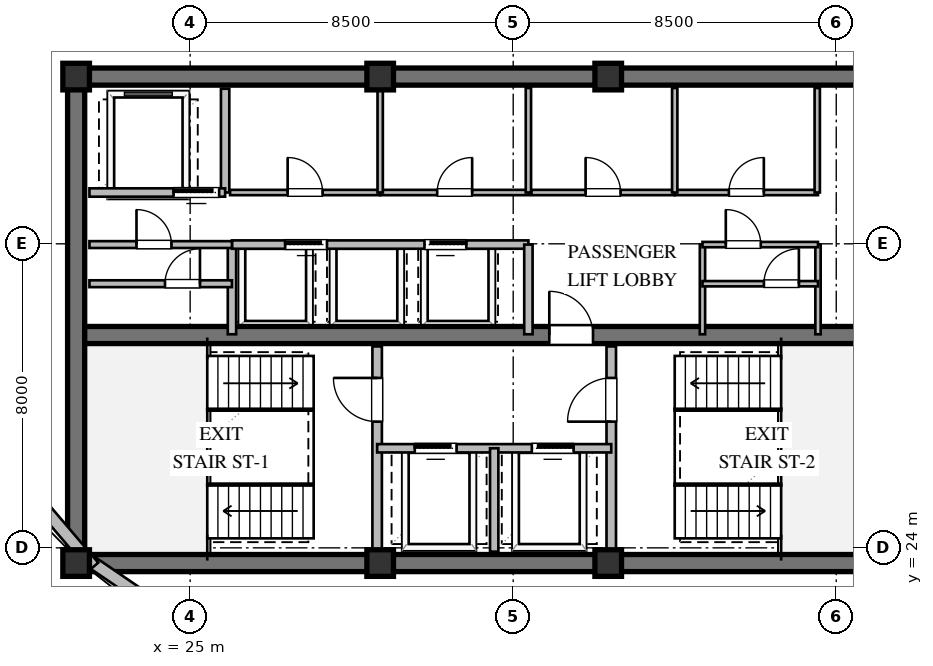
"""IFC4 building model, lengths in metres.
Left out: names, types, materials, properties, quantities, classifications, styles, units other than length and angle.
Written with IfcOpenShell. Run it as: python <this file> out.ifc"""

import sys

from ifc_helpers import new_model, si_unit, direction, frame, frame_2d, origin, origin_2d, place, context, subcontext, project, spatial, rectangle, extrude, element, fill, save


model = new_model("IFC4")
c1 = context("Model", 3, precision=1e-05, world=origin(), true_north=direction((0.0, 1.0)))
c2 = subcontext(c1, "Body", "Model", "MODEL_VIEW")
j1 = project(units=[si_unit("LENGTHUNIT", "METRE"), si_unit("PLANEANGLEUNIT", "RADIAN")], contexts=[c1])
p1 = place(None, origin())
s1 = spatial("IfcSite", under=j1, at=p1, CompositionType="ELEMENT")
p2 = place(p1, origin())
s2 = spatial("IfcBuilding", under=s1, at=p2, CompositionType="ELEMENT")
p3 = place(p2, frame((0.0, 0.0, 270.0)))
s3 = spatial("IfcBuildingStorey", under=s2, at=p3, CompositionType="ELEMENT", Elevation=270.0)
for number, where, z_axis, x_axis in (
    (1, (21.775, 23.6, 0.0), (0.0, 0.0, 1.0), (1.0, 0.0, 0.0)),
    (2, (21.775, 36.4, 0.0), (0.0, 0.0, 1.0), (1.0, 0.0, 0.0)),
):
    element("IfcWall", number, at=place(p3, frame(where, z_axis=z_axis, x_axis=x_axis)), inside=s3, PredefinedType="SHEAR", context=c2, shape_type="SweptSolid", body=[
        extrude(rectangle(XDim=22.45, YDim=0.45, at=frame_2d((11.225, 0.0))), origin(), (0.0, 0.0, 1.0), 3.56),
    ])
p4 = place(p3, frame((22.0, 23.825, 0.0), z_axis=(0.0, 0.0, 1.0), x_axis=(0.0, 1.0, 0.0)))
e3 = element("IfcWall", 3, at=p4, inside=s3, PredefinedType="SHEAR", context=c2, shape_type="SweptSolid", body=[
    extrude(rectangle(XDim=12.35, YDim=0.45, at=frame_2d((6.175, 0.0))), origin(), (0.0, 0.0, 1.0), 3.56),
])
p5 = place(p3, frame((22.225, 29.6, 0.0), z_axis=(0.0, 0.0, 1.0), x_axis=(1.0, 0.0, 0.0)))
e4 = element("IfcWall", 4, at=p5, inside=s3, PredefinedType="SHEAR", context=c2, shape_type="SweptSolid", body=[
    extrude(rectangle(XDim=21.55, YDim=0.45, at=frame_2d((10.775, 0.0))), origin(), (0.0, 0.0, 1.0), 3.56),
])
p6 = place(p5, frame((12.225, 0.0, 0.0)))
e5 = element("IfcOpeningElement", 5, at=p6, cuts=e4, PredefinedType="OPENING", context=c2, shape_type="SweptSolid", body=[
    extrude(rectangle(XDim=1.15, YDim=2.1, at=frame_2d((0.575, 1.05))), frame((0.0, 0.235, 0.0), z_axis=(0.0, -1.0, 0.0), x_axis=(1.0, 0.0, 0.0)), (0.0, 0.0, 1.0), 0.47),
])
for number, where, z_axis, x_axis in (
    (6, (22.0, 23.6, 0.0), (0.0, 0.0, 1.0), (1.0, 0.0, 0.0)),
    (7, (30.0, 23.6, 0.0), (0.0, 0.0, 1.0), (1.0, 0.0, 0.0)),
    (8, (36.0, 23.6, 0.0), (0.0, 0.0, 1.0), (1.0, 0.0, 0.0)),
    (9, (36.0, 36.4, 0.0), (0.0, 0.0, 1.0), (1.0, 0.0, 0.0)),
    (10, (30.0, 36.4, 0.0), (0.0, 0.0, 1.0), (1.0, 0.0, 0.0)),
    (11, (22.0, 36.4, 0.0), (0.0, 0.0, 1.0), (1.0, 0.0, 0.0)),
):
    element("IfcColumn", number, at=place(p3, frame(where, z_axis=z_axis, x_axis=x_axis)), inside=s3, PredefinedType="COLUMN", context=c2, shape_type="SweptSolid", body=[
        extrude(rectangle(XDim=0.7, YDim=0.7, at=origin_2d()), origin(), (0.0, 0.0, 1.0), 3.8),
    ])
p7 = place(p3, frame((27.093, 20.428, 0.0), z_axis=(0.0, 0.0, 1.0), x_axis=(-0.826047009588, 0.563601222454, 0.0)))
e12 = element("IfcWall", 12, at=p7, inside=s3, PredefinedType="STANDARD", context=c2, shape_type="SweptSolid", body=[
    extrude(rectangle(XDim=6.074, YDim=0.32, at=frame_2d((3.037, 0.0))), origin(), (0.0, 0.0, 1.0), 2.35),
])
p8 = place(p3, frame((22.46, 23.506, 0.0), z_axis=(0.0, 0.0, 1.0), x_axis=(-0.648393724369, 0.761305180725, 0.0)))
e13 = element("IfcWall", 13, at=p8, inside=s3, PredefinedType="STANDARD", context=c2, shape_type="SweptSolid", body=[
    extrude(rectangle(XDim=5.836, YDim=0.32, at=frame_2d((2.918, 0.0))), origin(), (0.0, 0.0, 1.0), 2.7),
])
p9 = place(p3, frame((29.92, 23.9, 0.0), z_axis=(0.0, 0.0, 1.0), x_axis=(0.0, 1.0, 0.0)))
e14 = element("IfcWall", 14, at=p9, inside=s3, PredefinedType="SOLIDWALL", context=c2, shape_type="SweptSolid", body=[
    extrude(rectangle(XDim=5.4, YDim=0.25, at=frame_2d((2.7, 0.0))), origin(), (0.0, 0.0, 1.0), 3.09),
])
p10 = place(p9, frame((3.421, 0.0, 0.0)))
e15 = element("IfcOpeningElement", 15, at=p10, cuts=e14, PredefinedType="OPENING", context=c2, shape_type="SweptSolid", body=[
    extrude(rectangle(XDim=1.15, YDim=2.1, at=frame_2d((0.575, 1.05))), frame((0.0, 0.135, 0.0), z_axis=(0.0, -1.0, 0.0), x_axis=(1.0, 0.0, 0.0)), (0.0, 0.0, 1.0), 0.27),
])
p11 = place(p3, frame((36.08, 23.9, 0.0), z_axis=(0.0, 0.0, 1.0), x_axis=(0.0, 1.0, 0.0)))
e16 = element("IfcWall", 16, at=p11, inside=s3, PredefinedType="SOLIDWALL", context=c2, shape_type="SweptSolid", body=[
    extrude(rectangle(XDim=5.4, YDim=0.25, at=frame_2d((2.7, 0.0))), origin(), (0.0, 0.0, 1.0), 3.56),
])
p12 = place(p11, frame((3.421, 0.0, 0.0)))
e17 = element("IfcOpeningElement", 17, at=p12, cuts=e16, PredefinedType="OPENING", context=c2, shape_type="SweptSolid", body=[
    extrude(rectangle(XDim=1.15, YDim=2.1, at=frame_2d((0.575, 1.05))), frame((0.0, 0.135, 0.0), z_axis=(0.0, -1.0, 0.0), x_axis=(1.0, 0.0, 0.0)), (0.0, 0.0, 1.0), 0.27),
])
p13 = place(p3, frame((29.92, 26.62, 0.0), z_axis=(0.0, 0.0, 1.0), x_axis=(1.0, 0.0, 0.0)))
e18 = element("IfcWall", 18, at=p13, inside=s3, PredefinedType="SOLIDWALL", context=c2, shape_type="SweptSolid", body=[
    extrude(rectangle(XDim=6.16, YDim=0.22, at=frame_2d((3.08, 0.0))), origin(), (0.0, 0.0, 1.0), 3.56),
])
p14 = place(p13, frame((0.99, 0.0, 0.0)))
e19 = element("IfcOpeningElement", 19, at=p14, cuts=e18, PredefinedType="OPENING", context=c2, shape_type="SweptSolid", body=[
    extrude(rectangle(XDim=1.1, YDim=2.1, at=frame_2d((0.55, 1.05))), frame((0.0, 0.12, 0.0), z_axis=(0.0, -1.0, 0.0), x_axis=(1.0, 0.0, 0.0)), (0.0, 0.0, 1.0), 0.24),
])
p15 = place(p13, frame((4.07, 0.0, 0.0)))
e20 = element("IfcOpeningElement", 20, at=p15, cuts=e18, PredefinedType="OPENING", context=c2, shape_type="SweptSolid", body=[
    extrude(rectangle(XDim=1.1, YDim=2.1, at=frame_2d((0.55, 1.05))), frame((0.0, 0.12, 0.0), z_axis=(0.0, -1.0, 0.0), x_axis=(1.0, 0.0, 0.0)), (0.0, 0.0, 1.0), 0.24),
])
p16 = place(p3, frame((33.0, 23.9, 0.0), z_axis=(0.0, 0.0, 1.0), x_axis=(0.0, 1.0, 0.0)))
e21 = element("IfcWall", 21, at=p16, inside=s3, PredefinedType="SOLIDWALL", context=c2, shape_type="SweptSolid", body=[
    extrude(rectangle(XDim=2.72, YDim=0.22, at=frame_2d((1.36, 0.0))), origin(), (0.0, 0.0, 1.0), 3.56),
])
p17 = place(p3, frame((25.92, 33.35, 0.0), z_axis=(0.0, 0.0, 1.0), x_axis=(0.0, 1.0, 0.0)))
e22 = element("IfcWall", 22, at=p17, inside=s3, PredefinedType="SOLIDWALL", context=c2, shape_type="SweptSolid", body=[
    extrude(rectangle(XDim=2.73, YDim=0.22, at=frame_2d((1.365, 0.0))), origin(), (0.0, 0.0, 1.0), 3.56),
])
p18 = place(p3, frame((22.35, 33.35, 0.0), z_axis=(0.0, 0.0, 1.0), x_axis=(1.0, 0.0, 0.0)))
e23 = element("IfcWall", 23, at=p18, inside=s3, PredefinedType="SOLIDWALL", context=c2, shape_type="SweptSolid", body=[
    extrude(rectangle(XDim=3.57, YDim=0.22, at=frame_2d((1.785, 0.0))), origin(), (0.0, 0.0, 1.0), 3.56),
])
p19 = place(p18, frame((2.213, 0.0, 0.0)))
e24 = element("IfcOpeningElement", 24, at=p19, cuts=e23, PredefinedType="OPENING", context=c2, shape_type="SweptSolid", body=[
    extrude(rectangle(XDim=1.2, YDim=2.1, at=frame_2d((0.6, 1.05))), frame((0.0, 0.12, 0.0), z_axis=(0.0, -1.0, 0.0), x_axis=(1.0, 0.0, 0.0)), (0.0, 0.0, 1.0), 0.24),
])
p20 = place(p3, frame((26.1, 29.62, 0.0), z_axis=(0.0, 0.0, 1.0), x_axis=(0.0, 1.0, 0.0)))
e25 = element("IfcWall", 25, at=p20, inside=s3, PredefinedType="SOLIDWALL", context=c2, shape_type="SweptSolid", body=[
    extrude(rectangle(XDim=2.36, YDim=0.22, at=frame_2d((1.18, 0.0))), origin(), (0.0, 0.0, 1.0), 3.56),
])
p21 = place(p3, frame((26.1, 31.98, 0.0), z_axis=(0.0, 0.0, 1.0), x_axis=(1.0, 0.0, 0.0)))
e26 = element("IfcWall", 26, at=p21, inside=s3, PredefinedType="SOLIDWALL", context=c2, shape_type="SweptSolid", body=[
    extrude(rectangle(XDim=7.8, YDim=0.22, at=frame_2d((3.9, 0.0))), origin(), (0.0, 0.0, 1.0), 3.56),
])
p22 = place(p21, frame((1.4, 0.0, 0.0)))
e27 = element("IfcOpeningElement", 27, at=p22, cuts=e26, PredefinedType="OPENING", context=c2, shape_type="SweptSolid", body=[
    extrude(rectangle(XDim=1.1, YDim=2.1, at=frame_2d((0.55, 1.05))), frame((0.0, 0.12, 0.0), z_axis=(0.0, -1.0, 0.0), x_axis=(1.0, 0.0, 0.0)), (0.0, 0.0, 1.0), 0.24),
])
p23 = place(p21, frame((5.066, 0.0, 0.0)))
e28 = element("IfcOpeningElement", 28, at=p23, cuts=e26, PredefinedType="OPENING", context=c2, shape_type="SweptSolid", body=[
    extrude(rectangle(XDim=1.1, YDim=2.1, at=frame_2d((0.55, 1.05))), frame((0.0, 0.12, 0.0), z_axis=(0.0, -1.0, 0.0), x_axis=(1.0, 0.0, 0.0)), (0.0, 0.0, 1.0), 0.24),
])
p24 = place(p3, frame((33.9, 29.62, 0.0), z_axis=(0.0, 0.0, 1.0), x_axis=(0.0, 1.0, 0.0)))
e29 = element("IfcWall", 29, at=p24, inside=s3, PredefinedType="SOLIDWALL", context=c2, shape_type="SweptSolid", body=[
    extrude(rectangle(XDim=2.36, YDim=0.22, at=frame_2d((1.18, 0.0))), origin(), (0.0, 0.0, 1.0), 3.56),
])
p25 = place(p3, frame((26.05, 33.35, 0.0), z_axis=(0.0, 0.0, 1.0), x_axis=(1.0, 0.0, 0.0)))
e30 = element("IfcWall", 30, at=p25, inside=s3, PredefinedType="PARTITIONING", context=c2, shape_type="SweptSolid", body=[
    extrude(rectangle(XDim=3.95, YDim=0.14, at=frame_2d((1.975, 0.0))), origin(), (0.0, 0.0, 1.0), 3.56),
])
p26 = place(p25, frame((1.515, 0.0, 0.0)))
e31 = element("IfcOpeningElement", 31, at=p26, cuts=e30, PredefinedType="OPENING", context=c2, shape_type="SweptSolid", body=[
    extrude(rectangle(XDim=0.92, YDim=2.1, at=frame_2d((0.46, 1.05))), frame((0.0, 0.08, 0.0), z_axis=(0.0, -1.0, 0.0), x_axis=(1.0, 0.0, 0.0)), (0.0, 0.0, 1.0), 0.16),
])
p27 = place(p3, frame((30.0, 33.35, 0.0), z_axis=(0.0, 0.0, 1.0), x_axis=(1.0, 0.0, 0.0)))
e32 = element("IfcWall", 32, at=p27, inside=s3, PredefinedType="PARTITIONING", context=c2, shape_type="SweptSolid", body=[
    extrude(rectangle(XDim=3.92, YDim=0.14, at=frame_2d((1.96, 0.0))), origin(), (0.0, 0.0, 1.0), 3.56),
])
p28 = place(p27, frame((1.5, 0.0, 0.0)))
e33 = element("IfcOpeningElement", 33, at=p28, cuts=e32, PredefinedType="OPENING", context=c2, shape_type="SweptSolid", body=[
    extrude(rectangle(XDim=0.92, YDim=2.1, at=frame_2d((0.46, 1.05))), frame((0.0, 0.08, 0.0), z_axis=(0.0, -1.0, 0.0), x_axis=(1.0, 0.0, 0.0)), (0.0, 0.0, 1.0), 0.16),
])
for number, where, z_axis, x_axis in (
    (34, (30.0, 33.35, 0.0), (0.0, 0.0, 1.0), (0.0, 1.0, 0.0)),
    (35, (33.9, 33.35, 0.0), (0.0, 0.0, 1.0), (0.0, 1.0, 0.0)),
):
    element("IfcWall", number, at=place(p3, frame(where, z_axis=z_axis, x_axis=x_axis)), inside=s3, PredefinedType="PARTITIONING", context=c2, shape_type="SweptSolid", body=[
        extrude(rectangle(XDim=2.75, YDim=0.14, at=frame_2d((1.375, 0.0))), origin(), (0.0, 0.0, 1.0), 3.56),
    ])
p29 = place(p3, frame((33.98, 33.35, 0.0), z_axis=(0.0, 0.0, 1.0), x_axis=(1.0, 0.0, 0.0)))
e36 = element("IfcWall", 36, at=p29, inside=s3, PredefinedType="PARTITIONING", context=c2, shape_type="SweptSolid", body=[
    extrude(rectangle(XDim=3.77, YDim=0.14, at=frame_2d((1.885, 0.0))), origin(), (0.0, 0.0, 1.0), 3.56),
])
p30 = place(p29, frame((1.425, 0.0, 0.0)))
e37 = element("IfcOpeningElement", 37, at=p30, cuts=e36, PredefinedType="OPENING", context=c2, shape_type="SweptSolid", body=[
    extrude(rectangle(XDim=0.92, YDim=2.1, at=frame_2d((0.46, 1.05))), frame((0.0, 0.08, 0.0), z_axis=(0.0, -1.0, 0.0), x_axis=(1.0, 0.0, 0.0)), (0.0, 0.0, 1.0), 0.16),
])
p31 = place(p3, frame((37.75, 33.35, 0.0), z_axis=(0.0, 0.0, 1.0), x_axis=(1.0, 0.0, 0.0)))
e38 = element("IfcWall", 38, at=p31, inside=s3, PredefinedType="PARTITIONING", context=c2, shape_type="SweptSolid", body=[
    extrude(rectangle(XDim=3.77, YDim=0.14, at=frame_2d((1.885, 0.0))), origin(), (0.0, 0.0, 1.0), 3.56),
])
p32 = place(p31, frame((1.425, 0.0, 0.0)))
e39 = element("IfcOpeningElement", 39, at=p32, cuts=e38, PredefinedType="OPENING", context=c2, shape_type="SweptSolid", body=[
    extrude(rectangle(XDim=0.92, YDim=2.1, at=frame_2d((0.46, 1.05))), frame((0.0, 0.08, 0.0), z_axis=(0.0, -1.0, 0.0), x_axis=(1.0, 0.0, 0.0)), (0.0, 0.0, 1.0), 0.16),
])
for number, where, z_axis, x_axis in (
    (40, (37.75, 33.35, 0.0), (0.0, 0.0, 1.0), (0.0, 1.0, 0.0)),
    (41, (41.5, 33.35, 0.0), (0.0, 0.0, 1.0), (0.0, 1.0, 0.0)),
):
    element("IfcWall", number, at=place(p3, frame(where, z_axis=z_axis, x_axis=x_axis)), inside=s3, PredefinedType="PARTITIONING", context=c2, shape_type="SweptSolid", body=[
        extrude(rectangle(XDim=2.75, YDim=0.14, at=frame_2d((1.375, 0.0))), origin(), (0.0, 0.0, 1.0), 3.56),
    ])
p33 = place(p3, frame((22.35, 30.95, 0.0), z_axis=(0.0, 0.0, 1.0), x_axis=(1.0, 0.0, 0.0)))
e42 = element("IfcWall", 42, at=p33, inside=s3, PredefinedType="PARTITIONING", context=c2, shape_type="SweptSolid", body=[
    extrude(rectangle(XDim=3.75, YDim=0.18, at=frame_2d((1.875, 0.0))), origin(), (0.0, 0.0, 1.0), 3.56),
])
p34 = place(p33, frame((1.988, 0.0, 0.0)))
e43 = element("IfcOpeningElement", 43, at=p34, cuts=e42, PredefinedType="OPENING", context=c2, shape_type="SweptSolid", body=[
    extrude(rectangle(XDim=0.92, YDim=2.1, at=frame_2d((0.46, 1.05))), frame((0.0, 0.1, 0.0), z_axis=(0.0, -1.0, 0.0), x_axis=(1.0, 0.0, 0.0)), (0.0, 0.0, 1.0), 0.2),
])
p35 = place(p3, frame((22.35, 31.98, 0.0), z_axis=(0.0, 0.0, 1.0), x_axis=(1.0, 0.0, 0.0)))
e44 = element("IfcWall", 44, at=p35, inside=s3, PredefinedType="PARTITIONING", context=c2, shape_type="SweptSolid", body=[
    extrude(rectangle(XDim=3.75, YDim=0.18, at=frame_2d((1.875, 0.0))), origin(), (0.0, 0.0, 1.0), 3.56),
])
p36 = place(p35, frame((1.238, 0.0, 0.0)))
e45 = element("IfcOpeningElement", 45, at=p36, cuts=e44, PredefinedType="OPENING", context=c2, shape_type="SweptSolid", body=[
    extrude(rectangle(XDim=0.92, YDim=2.1, at=frame_2d((0.46, 1.05))), frame((0.0, 0.1, 0.0), z_axis=(0.0, -1.0, 0.0), x_axis=(1.0, 0.0, 0.0)), (0.0, 0.0, 1.0), 0.2),
])
for number, where, z_axis, x_axis in (
    (46, (38.48, 29.62, 0.0), (0.0, 0.0, 1.0), (0.0, 1.0, 0.0)),
    (47, (41.52, 29.62, 0.0), (0.0, 0.0, 1.0), (0.0, 1.0, 0.0)),
):
    element("IfcWall", number, at=place(p3, frame(where, z_axis=z_axis, x_axis=x_axis)), inside=s3, PredefinedType="PARTITIONING", context=c2, shape_type="SweptSolid", body=[
        extrude(rectangle(XDim=2.36, YDim=0.14, at=frame_2d((1.18, 0.0))), origin(), (0.0, 0.0, 1.0), 3.56),
    ])
p37 = place(p3, frame((38.48, 30.95, 0.0), z_axis=(0.0, 0.0, 1.0), x_axis=(1.0, 0.0, 0.0)))
e48 = element("IfcWall", 48, at=p37, inside=s3, PredefinedType="PARTITIONING", context=c2, shape_type="SweptSolid", body=[
    extrude(rectangle(XDim=3.04, YDim=0.14, at=frame_2d((1.52, 0.0))), origin(), (0.0, 0.0, 1.0), 3.56),
])
p38 = place(p37, frame((1.617, 0.0, 0.0)))
e49 = element("IfcOpeningElement", 49, at=p38, cuts=e48, PredefinedType="OPENING", context=c2, shape_type="SweptSolid", body=[
    extrude(rectangle(XDim=0.92, YDim=2.1, at=frame_2d((0.46, 1.05))), frame((0.0, 0.08, 0.0), z_axis=(0.0, -1.0, 0.0), x_axis=(1.0, 0.0, 0.0)), (0.0, 0.0, 1.0), 0.16),
])
p39 = place(p3, frame((38.48, 31.98, 0.0), z_axis=(0.0, 0.0, 1.0), x_axis=(1.0, 0.0, 0.0)))
e50 = element("IfcWall", 50, at=p39, inside=s3, PredefinedType="PARTITIONING", context=c2, shape_type="SweptSolid", body=[
    extrude(rectangle(XDim=3.04, YDim=0.14, at=frame_2d((1.52, 0.0))), origin(), (0.0, 0.0, 1.0), 3.56),
])
p40 = place(p39, frame((0.614, 0.0, 0.0)))
e51 = element("IfcOpeningElement", 51, at=p40, cuts=e50, PredefinedType="OPENING", context=c2, shape_type="SweptSolid", body=[
    extrude(rectangle(XDim=0.92, YDim=2.1, at=frame_2d((0.46, 1.05))), frame((0.0, 0.08, 0.0), z_axis=(0.0, -1.0, 0.0), x_axis=(1.0, 0.0, 0.0)), (0.0, 0.0, 1.0), 0.16),
])
p41 = place(p10, origin())
e52 = element("IfcDoor", 52, at=p41, inside=s3, OperationType="SINGLE_SWING_RIGHT", PredefinedType="DOOR", context=c2, shape_type="SweptSolid", body=[
    extrude(rectangle(XDim=1.15, YDim=2.1, at=frame_2d((0.575, 1.05))), frame((0.0, 0.025, 0.0), z_axis=(0.0, -1.0, 0.0), x_axis=(1.0, 0.0, 0.0)), (0.0, 0.0, 1.0), 0.05),
])
fill(e15, e52)
p42 = place(p12, origin())
e53 = element("IfcDoor", 53, at=p42, inside=s3, OperationType="SINGLE_SWING_LEFT", PredefinedType="DOOR", context=c2, shape_type="SweptSolid", body=[
    extrude(rectangle(XDim=1.15, YDim=2.1, at=frame_2d((0.575, 1.05))), frame((0.0, 0.025, 0.0), z_axis=(0.0, -1.0, 0.0), x_axis=(1.0, 0.0, 0.0)), (0.0, 0.0, 1.0), 0.05),
])
fill(e17, e53)
p43 = place(p14, origin())
e54 = element("IfcDoor", 54, at=p43, inside=s3, OperationType="SLIDING_TO_LEFT", PredefinedType="DOOR", context=c2, shape_type="SweptSolid", body=[
    extrude(rectangle(XDim=1.1, YDim=2.1, at=frame_2d((0.55, 1.05))), frame((0.0, 0.025, 0.0), z_axis=(0.0, -1.0, 0.0), x_axis=(1.0, 0.0, 0.0)), (0.0, 0.0, 1.0), 0.05),
])
fill(e19, e54)
p44 = place(p15, origin())
e55 = element("IfcDoor", 55, at=p44, inside=s3, OperationType="SLIDING_TO_RIGHT", PredefinedType="DOOR", context=c2, shape_type="SweptSolid", body=[
    extrude(rectangle(XDim=1.1, YDim=2.1, at=frame_2d((0.55, 1.05))), frame((0.0, 0.025, 0.0), z_axis=(0.0, -1.0, 0.0), x_axis=(1.0, 0.0, 0.0)), (0.0, 0.0, 1.0), 0.05),
])
fill(e20, e55)
p45 = place(p6, origin())
e56 = element("IfcDoor", 56, at=p45, inside=s3, OperationType="SINGLE_SWING_LEFT", PredefinedType="DOOR", context=c2, shape_type="SweptSolid", body=[
    extrude(rectangle(XDim=1.15, YDim=2.1, at=frame_2d((0.575, 1.05))), frame((0.0, 0.025, 0.0), z_axis=(0.0, -1.0, 0.0), x_axis=(1.0, 0.0, 0.0)), (0.0, 0.0, 1.0), 0.05),
])
fill(e5, e56)
p46 = place(p19, origin())
e57 = element("IfcDoor", 57, at=p46, inside=s3, OperationType="SLIDING_TO_LEFT", PredefinedType="DOOR", context=c2, shape_type="SweptSolid", body=[
    extrude(rectangle(XDim=1.2, YDim=2.1, at=frame_2d((0.6, 1.05))), frame((0.0, 0.025, 0.0), z_axis=(0.0, -1.0, 0.0), x_axis=(1.0, 0.0, 0.0)), (0.0, 0.0, 1.0), 0.05),
])
fill(e24, e57)
p47 = place(p22, origin())
e58 = element("IfcDoor", 58, at=p47, inside=s3, OperationType="SLIDING_TO_LEFT", PredefinedType="DOOR", context=c2, shape_type="SweptSolid", body=[
    extrude(rectangle(XDim=1.1, YDim=2.1, at=frame_2d((0.55, 1.05))), frame((0.0, 0.025, 0.0), z_axis=(0.0, -1.0, 0.0), x_axis=(1.0, 0.0, 0.0)), (0.0, 0.0, 1.0), 0.05),
])
fill(e27, e58)
p48 = place(p23, origin())
e59 = element("IfcDoor", 59, at=p48, inside=s3, OperationType="SLIDING_TO_RIGHT", PredefinedType="DOOR", context=c2, shape_type="SweptSolid", body=[
    extrude(rectangle(XDim=1.1, YDim=2.1, at=frame_2d((0.55, 1.05))), frame((0.0, 0.025, 0.0), z_axis=(0.0, -1.0, 0.0), x_axis=(1.0, 0.0, 0.0)), (0.0, 0.0, 1.0), 0.05),
])
fill(e28, e59)
p49 = place(p26, origin())
e60 = element("IfcDoor", 60, at=p49, inside=s3, OperationType="SINGLE_SWING_LEFT", PredefinedType="DOOR", context=c2, shape_type="SweptSolid", body=[
    extrude(rectangle(XDim=0.92, YDim=2.1, at=frame_2d((0.46, 1.05))), frame((0.0, 0.025, 0.0), z_axis=(0.0, -1.0, 0.0), x_axis=(1.0, 0.0, 0.0)), (0.0, 0.0, 1.0), 0.05),
])
fill(e31, e60)
p50 = place(p28, origin())
e61 = element("IfcDoor", 61, at=p50, inside=s3, OperationType="SINGLE_SWING_RIGHT", PredefinedType="DOOR", context=c2, shape_type="SweptSolid", body=[
    extrude(rectangle(XDim=0.92, YDim=2.1, at=frame_2d((0.46, 1.05))), frame((0.0, 0.025, 0.0), z_axis=(0.0, -1.0, 0.0), x_axis=(1.0, 0.0, 0.0)), (0.0, 0.0, 1.0), 0.05),
])
fill(e33, e61)
p51 = place(p30, origin())
e62 = element("IfcDoor", 62, at=p51, inside=s3, OperationType="SINGLE_SWING_LEFT", PredefinedType="DOOR", context=c2, shape_type="SweptSolid", body=[
    extrude(rectangle(XDim=0.92, YDim=2.1, at=frame_2d((0.46, 1.05))), frame((0.0, 0.025, 0.0), z_axis=(0.0, -1.0, 0.0), x_axis=(1.0, 0.0, 0.0)), (0.0, 0.0, 1.0), 0.05),
])
fill(e37, e62)
p52 = place(p32, origin())
e63 = element("IfcDoor", 63, at=p52, inside=s3, OperationType="SINGLE_SWING_RIGHT", PredefinedType="DOOR", context=c2, shape_type="SweptSolid", body=[
    extrude(rectangle(XDim=0.92, YDim=2.1, at=frame_2d((0.46, 1.05))), frame((0.0, 0.025, 0.0), z_axis=(0.0, -1.0, 0.0), x_axis=(1.0, 0.0, 0.0)), (0.0, 0.0, 1.0), 0.05),
])
fill(e39, e63)
p53 = place(p36, origin())
e64 = element("IfcDoor", 64, at=p53, inside=s3, OperationType="SINGLE_SWING_LEFT", PredefinedType="DOOR", context=c2, shape_type="SweptSolid", body=[
    extrude(rectangle(XDim=0.92, YDim=2.1, at=frame_2d((0.46, 1.05))), frame((0.0, 0.025, 0.0), z_axis=(0.0, -1.0, 0.0), x_axis=(1.0, 0.0, 0.0)), (0.0, 0.0, 1.0), 0.05),
])
fill(e45, e64)
p54 = place(p34, origin())
e65 = element("IfcDoor", 65, at=p54, inside=s3, OperationType="SINGLE_SWING_RIGHT", PredefinedType="DOOR", context=c2, shape_type="SweptSolid", body=[
    extrude(rectangle(XDim=0.92, YDim=2.1, at=frame_2d((0.46, 1.05))), frame((0.0, 0.025, 0.0), z_axis=(0.0, -1.0, 0.0), x_axis=(1.0, 0.0, 0.0)), (0.0, 0.0, 1.0), 0.05),
])
fill(e43, e65)
p55 = place(p40, origin())
e66 = element("IfcDoor", 66, at=p55, inside=s3, OperationType="SINGLE_SWING_LEFT", PredefinedType="DOOR", context=c2, shape_type="SweptSolid", body=[
    extrude(rectangle(XDim=0.92, YDim=2.1, at=frame_2d((0.46, 1.05))), frame((0.0, 0.025, 0.0), z_axis=(0.0, -1.0, 0.0), x_axis=(1.0, 0.0, 0.0)), (0.0, 0.0, 1.0), 0.05),
])
fill(e51, e66)
p56 = place(p38, origin())
e67 = element("IfcDoor", 67, at=p56, inside=s3, OperationType="SINGLE_SWING_RIGHT", PredefinedType="DOOR", context=c2, shape_type="SweptSolid", body=[
    extrude(rectangle(XDim=0.92, YDim=2.1, at=frame_2d((0.46, 1.05))), frame((0.0, 0.025, 0.0), z_axis=(0.0, -1.0, 0.0), x_axis=(1.0, 0.0, 0.0)), (0.0, 0.0, 1.0), 0.05),
])
fill(e49, e67)
save(model, sys.argv[1])
